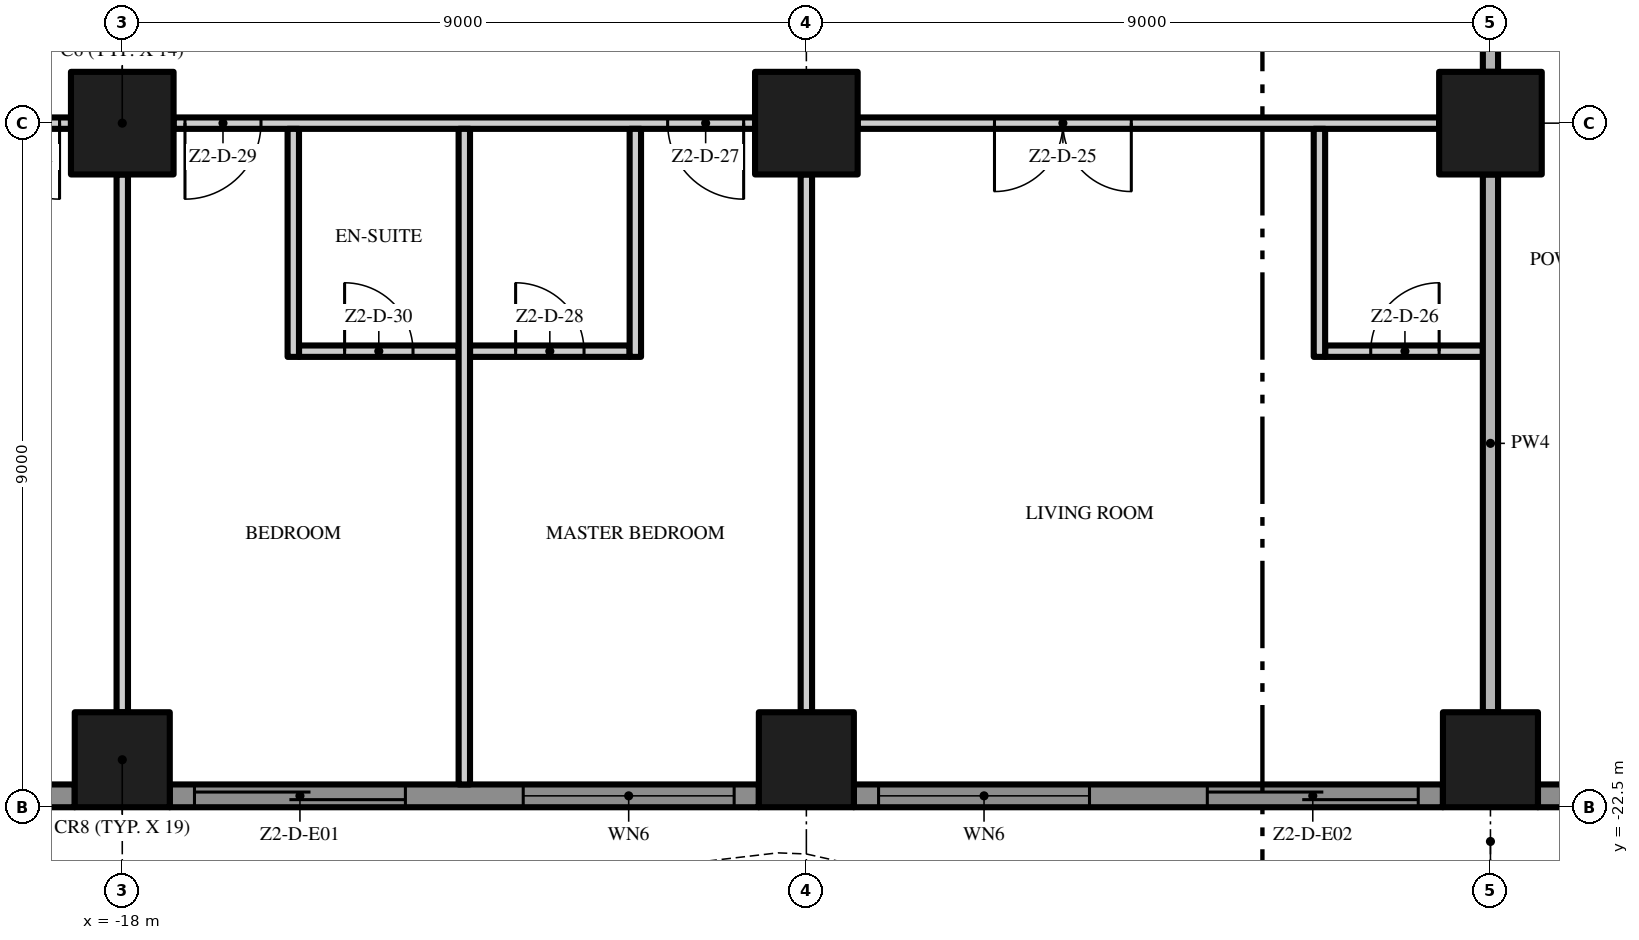
"""IFC4 building model, lengths in metres.
Left out: names, types, materials, properties, quantities, classifications, styles, units other than length and angle.
Written with IfcOpenShell. Run it as: python <this file> out.ifc"""

import sys

from ifc_helpers import new_model, si_unit, direction, frame, frame_2d, origin, origin_2d, place, context, subcontext, project, spatial, polyline, rectangle, outline, extrude, element, fill, save


model = new_model("IFC4")
c1 = context("Model", 3, precision=1e-05, world=origin(), true_north=direction((0.0, 1.0)))
c2 = subcontext(c1, "Body", "Model", "MODEL_VIEW")
j1 = project(units=[si_unit("LENGTHUNIT", "METRE"), si_unit("PLANEANGLEUNIT", "RADIAN")], contexts=[c1])
p1 = place(None, origin())
s1 = spatial("IfcSite", under=j1, at=p1, CompositionType="ELEMENT")
p2 = place(p1, origin())
s2 = spatial("IfcBuilding", under=s1, at=p2, CompositionType="ELEMENT")
p3 = place(p2, frame((0.0, 0.0, 103.6)))
s3 = spatial("IfcBuildingStorey", under=s2, at=p3, CompositionType="ELEMENT", Elevation=103.6)
p4 = place(p3, frame((-18.0, -13.5, 0.0), z_axis=(0.0, 0.0, 1.0), x_axis=(1.0, 0.0, 0.0)))
e1 = element("IfcColumn", 1, at=p4, inside=s3, PredefinedType="COLUMN", context=c2, shape_type="SweptSolid", body=[
    extrude(rectangle(XDim=1.35, YDim=1.35, at=origin_2d()), origin(), (0.0, 0.0, 1.0), 3.5),
])
p5 = place(p3, frame((-18.0, -21.875, 0.0), z_axis=(0.0, 0.0, 1.0), x_axis=(1.0, 0.0, 0.0)))
e2 = element("IfcColumn", 2, at=p5, inside=s3, PredefinedType="COLUMN", context=c2, shape_type="SweptSolid", body=[
    extrude(rectangle(XDim=1.25, YDim=1.25, at=origin_2d()), origin(), (0.0, 0.0, 1.0), 3.5),
])
p6 = place(p3, frame((-9.0, -13.5, 0.0), z_axis=(0.0, 0.0, 1.0), x_axis=(1.0, 0.0, 0.0)))
e3 = element("IfcColumn", 3, at=p6, inside=s3, PredefinedType="COLUMN", context=c2, shape_type="SweptSolid", body=[
    extrude(rectangle(XDim=1.35, YDim=1.35, at=origin_2d()), origin(), (0.0, 0.0, 1.0), 3.5),
])
p7 = place(p3, frame((-9.0, -21.875, 0.0), z_axis=(0.0, 0.0, 1.0), x_axis=(1.0, 0.0, 0.0)))
e4 = element("IfcColumn", 4, at=p7, inside=s3, PredefinedType="COLUMN", context=c2, shape_type="SweptSolid", body=[
    extrude(rectangle(XDim=1.25, YDim=1.25, at=origin_2d()), origin(), (0.0, 0.0, 1.0), 3.5),
])
p8 = place(p3, frame((0.0, -13.5, 0.0), z_axis=(0.0, 0.0, 1.0), x_axis=(1.0, 0.0, 0.0)))
e5 = element("IfcColumn", 5, at=p8, inside=s3, PredefinedType="COLUMN", context=c2, shape_type="SweptSolid", body=[
    extrude(rectangle(XDim=1.35, YDim=1.35, at=origin_2d()), origin(), (0.0, 0.0, 1.0), 3.5),
])
p9 = place(p3, frame((0.0, -21.875, 0.0), z_axis=(0.0, 0.0, 1.0), x_axis=(1.0, 0.0, 0.0)))
e6 = element("IfcColumn", 6, at=p9, inside=s3, PredefinedType="COLUMN", context=c2, shape_type="SweptSolid", body=[
    extrude(rectangle(XDim=1.25, YDim=1.25, at=origin_2d()), origin(), (0.0, 0.0, 1.0), 3.5),
])
p10 = place(p3, frame((-18.625, -22.35, 0.0), z_axis=(0.0, 0.0, 1.0), x_axis=(-1.0, 0.0, 0.0)))
e7 = element("IfcWall", 7, at=p10, inside=s3, PredefinedType="SOLIDWALL", context=c2, shape_type="SweptSolid", body=[
    extrude(rectangle(XDim=3.575, YDim=0.3, at=frame_2d((1.788, 0.0))), origin(), (0.0, 0.0, 1.0), 3.5),
])
p11 = place(p10, frame((0.325, 0.0, 0.45)))
e8 = element("IfcOpeningElement", 8, at=p11, cuts=e7, PredefinedType="OPENING", context=c2, shape_type="SweptSolid", body=[
    extrude(rectangle(XDim=2.775, YDim=2.65, at=frame_2d((1.387, 1.325))), frame((0.0, 0.16, 0.0), z_axis=(0.0, -1.0, 0.0), x_axis=(1.0, 0.0, 0.0)), (0.0, 0.0, 1.0), 0.32),
])
p12 = place(p3, frame((-9.625, -22.35, 0.0), z_axis=(0.0, 0.0, 1.0), x_axis=(-1.0, 0.0, 0.0)))
e9 = element("IfcWall", 9, at=p12, inside=s3, PredefinedType="SOLIDWALL", context=c2, shape_type="SweptSolid", body=[
    extrude(rectangle(XDim=7.75, YDim=0.3, at=frame_2d((3.875, 0.0))), origin(), (0.0, 0.0, 1.0), 3.5),
])
p13 = place(p12, frame((4.65, 0.0, 0.0)))
e10 = element("IfcOpeningElement", 10, at=p13, cuts=e9, PredefinedType="OPENING", context=c2, shape_type="SweptSolid", body=[
    extrude(rectangle(XDim=2.775, YDim=2.4, at=frame_2d((1.387, 1.2))), frame((0.0, 0.16, 0.0), z_axis=(0.0, -1.0, 0.0), x_axis=(1.0, 0.0, 0.0)), (0.0, 0.0, 1.0), 0.32),
])
p14 = place(p12, frame((0.325, 0.0, 0.45)))
e11 = element("IfcOpeningElement", 11, at=p14, cuts=e9, PredefinedType="OPENING", context=c2, shape_type="SweptSolid", body=[
    extrude(rectangle(XDim=2.775, YDim=2.65, at=frame_2d((1.387, 1.325))), frame((0.0, 0.16, 0.0), z_axis=(0.0, -1.0, 0.0), x_axis=(1.0, 0.0, 0.0)), (0.0, 0.0, 1.0), 0.32),
])
p15 = place(p3, frame((-0.625, -22.35, 0.0), z_axis=(0.0, 0.0, 1.0), x_axis=(-1.0, 0.0, 0.0)))
e12 = element("IfcWall", 12, at=p15, inside=s3, PredefinedType="SOLIDWALL", context=c2, shape_type="SweptSolid", body=[
    extrude(rectangle(XDim=7.75, YDim=0.3, at=frame_2d((3.875, 0.0))), origin(), (0.0, 0.0, 1.0), 3.5),
])
p16 = place(p15, frame((4.65, 0.0, 0.45)))
e13 = element("IfcOpeningElement", 13, at=p16, cuts=e12, PredefinedType="OPENING", context=c2, shape_type="SweptSolid", body=[
    extrude(rectangle(XDim=2.775, YDim=2.65, at=frame_2d((1.387, 1.325))), frame((0.0, 0.16, 0.0), z_axis=(0.0, -1.0, 0.0), x_axis=(1.0, 0.0, 0.0)), (0.0, 0.0, 1.0), 0.32),
])
p17 = place(p15, frame((0.325, 0.0, 0.0)))
e14 = element("IfcOpeningElement", 14, at=p17, cuts=e12, PredefinedType="OPENING", context=c2, shape_type="SweptSolid", body=[
    extrude(rectangle(XDim=2.775, YDim=2.4, at=frame_2d((1.387, 1.2))), frame((0.0, 0.16, 0.0), z_axis=(0.0, -1.0, 0.0), x_axis=(1.0, 0.0, 0.0)), (0.0, 0.0, 1.0), 0.32),
])
p18 = place(p3, frame((8.375, -22.35, 0.0), z_axis=(0.0, 0.0, 1.0), x_axis=(-1.0, 0.0, 0.0)))
e15 = element("IfcWall", 15, at=p18, inside=s3, PredefinedType="SOLIDWALL", context=c2, shape_type="SweptSolid", body=[
    extrude(rectangle(XDim=7.75, YDim=0.3, at=frame_2d((3.875, 0.0))), origin(), (0.0, 0.0, 1.0), 3.5),
])
p19 = place(p18, frame((4.65, 0.0, 0.45)))
e16 = element("IfcOpeningElement", 16, at=p19, cuts=e15, PredefinedType="OPENING", context=c2, shape_type="SweptSolid", body=[
    extrude(rectangle(XDim=2.775, YDim=2.65, at=frame_2d((1.387, 1.325))), frame((0.0, 0.16, 0.0), z_axis=(0.0, -1.0, 0.0), x_axis=(1.0, 0.0, 0.0)), (0.0, 0.0, 1.0), 0.32),
])
p20 = place(p18, frame((0.325, 0.0, 0.45)))
e17 = element("IfcOpeningElement", 17, at=p20, cuts=e15, PredefinedType="OPENING", context=c2, shape_type="SweptSolid", body=[
    extrude(rectangle(XDim=2.775, YDim=2.65, at=frame_2d((1.387, 1.325))), frame((0.0, 0.16, 0.0), z_axis=(0.0, -1.0, 0.0), x_axis=(1.0, 0.0, 0.0)), (0.0, 0.0, 1.0), 0.32),
])
p21 = place(p3, origin())
e18 = element("IfcWall", 18, at=p21, inside=s3, PredefinedType="USERDEFINED", context=c2, shape_type="SweptSolid", body=[
    extrude(outline(polyline([(-22.5, -23.451), (-21.0, -24.112), (-19.5, -24.845), (-18.0, -25.369), (-16.875, -25.5), (-16.5, -25.485), (-15.0, -25.149), (-13.5, -24.488), (-12.0, -23.755), (-10.5, -23.231), (-9.375, -23.1), (-9.0, -23.115), (-7.5, -23.451), (-6.0, -24.112), (-4.5, -24.845), (-3.0, -25.369), (-1.875, -25.5), (-1.5, -25.485), (0.0, -25.149), (1.5, -24.488), (3.0, -23.755), (4.5, -23.231), (5.625, -23.1), (6.0, -23.115), (7.5, -23.451), (9.0, -24.112), (10.5, -24.845), (12.0, -25.369), (13.125, -25.5), (13.5, -25.485), (15.0, -25.149), (16.5, -24.488), (18.0, -23.755), (19.5, -23.231), (20.625, -23.1), (21.0, -23.115), (22.5, -23.451), (22.555, -23.208), (21.033, -22.866), (20.615, -22.849), (19.444, -22.986), (17.904, -23.524), (16.395, -24.261), (14.921, -24.91), (13.467, -25.236), (13.135, -25.249), (12.056, -25.124), (10.596, -24.614), (9.105, -23.885), (7.579, -23.213), (6.033, -22.866), (5.615, -22.849), (4.444, -22.986), (2.904, -23.524), (1.395, -24.261), (-0.079, -24.91), (-1.533, -25.236), (-1.865, -25.249), (-2.944, -25.124), (-4.404, -24.614), (-5.895, -23.885), (-7.421, -23.213), (-8.967, -22.866), (-9.385, -22.849), (-10.556, -22.986), (-12.096, -23.524), (-13.605, -24.261), (-15.079, -24.91), (-16.533, -25.236), (-16.865, -25.249), (-17.944, -25.124), (-19.404, -24.614), (-20.895, -23.885), (-22.399, -23.223), (-22.5, -23.451)])), origin(), (0.0, 0.0, 1.0), 0.9),
])
p22 = place(p3, frame((-15.675, -16.5, 0.0), z_axis=(0.0, 0.0, 1.0), x_axis=(1.0, 0.0, 0.0)))
e19 = element("IfcWall", 19, at=p22, inside=s3, PredefinedType="PARTITIONING", context=c2, shape_type="SweptSolid", body=[
    extrude(rectangle(XDim=2.1, YDim=0.15, at=frame_2d((1.05, 0.0))), origin(), (0.0, 0.0, 1.0), 3.5),
])
p23 = place(p22, frame((0.6, 0.0, 0.0)))
e20 = element("IfcOpeningElement", 20, at=p23, cuts=e19, PredefinedType="OPENING", context=c2, shape_type="SweptSolid", body=[
    extrude(rectangle(XDim=0.9, YDim=2.1, at=frame_2d((0.45, 1.05))), frame((0.0, 0.085, 0.0), z_axis=(0.0, -1.0, 0.0), x_axis=(1.0, 0.0, 0.0)), (0.0, 0.0, 1.0), 0.17),
])
p24 = place(p3, frame((-13.425, -16.5, 0.0), z_axis=(0.0, 0.0, 1.0), x_axis=(1.0, 0.0, 0.0)))
e21 = element("IfcWall", 21, at=p24, inside=s3, PredefinedType="PARTITIONING", context=c2, shape_type="SweptSolid", body=[
    extrude(rectangle(XDim=2.1, YDim=0.15, at=frame_2d((1.05, 0.0))), origin(), (0.0, 0.0, 1.0), 3.5),
])
p25 = place(p24, frame((0.6, 0.0, 0.0)))
e22 = element("IfcOpeningElement", 22, at=p25, cuts=e21, PredefinedType="OPENING", context=c2, shape_type="SweptSolid", body=[
    extrude(rectangle(XDim=0.9, YDim=2.1, at=frame_2d((0.45, 1.05))), frame((0.0, 0.085, 0.0), z_axis=(0.0, -1.0, 0.0), x_axis=(1.0, 0.0, 0.0)), (0.0, 0.0, 1.0), 0.17),
])
p26 = place(p3, frame((-2.175, -16.5, 0.0), z_axis=(0.0, 0.0, 1.0), x_axis=(1.0, 0.0, 0.0)))
e23 = element("IfcWall", 23, at=p26, inside=s3, PredefinedType="PARTITIONING", context=c2, shape_type="SweptSolid", body=[
    extrude(rectangle(XDim=2.075, YDim=0.15, at=frame_2d((1.038, 0.0))), origin(), (0.0, 0.0, 1.0), 3.5),
])
p27 = place(p26, frame((0.6, 0.0, 0.0)))
e24 = element("IfcOpeningElement", 24, at=p27, cuts=e23, PredefinedType="OPENING", context=c2, shape_type="SweptSolid", body=[
    extrude(rectangle(XDim=0.9, YDim=2.1, at=frame_2d((0.45, 1.05))), frame((0.0, 0.085, 0.0), z_axis=(0.0, -1.0, 0.0), x_axis=(1.0, 0.0, 0.0)), (0.0, 0.0, 1.0), 0.17),
])
p28 = place(p3, frame((-18.675, -13.5, 0.0), z_axis=(0.0, 0.0, 1.0), x_axis=(-1.0, 0.0, 0.0)))
e25 = element("IfcWall", 25, at=p28, inside=s3, PredefinedType="PARTITIONING", context=c2, shape_type="SweptSolid", body=[
    extrude(rectangle(XDim=7.075, YDim=0.15, at=frame_2d((3.538, 0.0))), origin(), (0.0, 0.0, 1.0), 3.5),
])
p29 = place(p28, frame((0.15, 0.0, 0.0)))
e26 = element("IfcOpeningElement", 26, at=p29, cuts=e25, PredefinedType="OPENING", context=c2, shape_type="SweptSolid", body=[
    extrude(rectangle(XDim=1.0, YDim=2.4, at=frame_2d((0.5, 1.2))), frame((0.0, 0.085, 0.0), z_axis=(0.0, -1.0, 0.0), x_axis=(1.0, 0.0, 0.0)), (0.0, 0.0, 1.0), 0.17),
])
p30 = place(p28, frame((5.325, 0.0, 0.0)))
e27 = element("IfcOpeningElement", 27, at=p30, cuts=e25, PredefinedType="OPENING", context=c2, shape_type="SweptSolid", body=[
    extrude(rectangle(XDim=1.5, YDim=2.4, at=frame_2d((0.75, 1.2))), frame((0.0, 0.085, 0.0), z_axis=(0.0, -1.0, 0.0), x_axis=(1.0, 0.0, 0.0)), (0.0, 0.0, 1.0), 0.17),
])
p31 = place(p3, frame((-9.675, -13.5, 0.0), z_axis=(0.0, 0.0, 1.0), x_axis=(-1.0, 0.0, 0.0)))
e28 = element("IfcWall", 28, at=p31, inside=s3, PredefinedType="PARTITIONING", context=c2, shape_type="SweptSolid", body=[
    extrude(rectangle(XDim=7.65, YDim=0.15, at=frame_2d((3.825, 0.0))), origin(), (0.0, 0.0, 1.0), 3.5),
])
p32 = place(p31, frame((0.15, 0.0, 0.0)))
e29 = element("IfcOpeningElement", 29, at=p32, cuts=e28, PredefinedType="OPENING", context=c2, shape_type="SweptSolid", body=[
    extrude(rectangle(XDim=1.0, YDim=2.4, at=frame_2d((0.5, 1.2))), frame((0.0, 0.085, 0.0), z_axis=(0.0, -1.0, 0.0), x_axis=(1.0, 0.0, 0.0)), (0.0, 0.0, 1.0), 0.17),
])
p33 = place(p31, frame((6.5, 0.0, 0.0)))
e30 = element("IfcOpeningElement", 30, at=p33, cuts=e28, PredefinedType="OPENING", context=c2, shape_type="SweptSolid", body=[
    extrude(rectangle(XDim=1.0, YDim=2.4, at=frame_2d((0.5, 1.2))), frame((0.0, 0.085, 0.0), z_axis=(0.0, -1.0, 0.0), x_axis=(1.0, 0.0, 0.0)), (0.0, 0.0, 1.0), 0.17),
])
p34 = place(p3, frame((-0.675, -13.5, 0.0), z_axis=(0.0, 0.0, 1.0), x_axis=(-1.0, 0.0, 0.0)))
e31 = element("IfcWall", 31, at=p34, inside=s3, PredefinedType="PARTITIONING", context=c2, shape_type="SweptSolid", body=[
    extrude(rectangle(XDim=7.65, YDim=0.15, at=frame_2d((3.825, 0.0))), origin(), (0.0, 0.0, 1.0), 3.5),
])
p35 = place(p34, frame((4.05, 0.0, 0.0)))
e32 = element("IfcOpeningElement", 32, at=p35, cuts=e31, PredefinedType="OPENING", context=c2, shape_type="SweptSolid", body=[
    extrude(rectangle(XDim=1.8, YDim=2.4, at=frame_2d((0.9, 1.2))), frame((0.0, 0.085, 0.0), z_axis=(0.0, -1.0, 0.0), x_axis=(1.0, 0.0, 0.0)), (0.0, 0.0, 1.0), 0.17),
])
p36 = place(p3, frame((-18.0, -21.25, 0.0), z_axis=(0.0, 0.0, 1.0), x_axis=(0.0, 1.0, 0.0)))
e33 = element("IfcWall", 33, at=p36, inside=s3, PredefinedType="PARTITIONING", context=c2, shape_type="SweptSolid", body=[
    extrude(rectangle(XDim=7.075, YDim=0.15, at=frame_2d((3.538, 0.0))), origin(), (0.0, 0.0, 1.0), 3.5),
])
p37 = place(p3, frame((-15.75, -16.575, 0.0), z_axis=(0.0, 0.0, 1.0), x_axis=(0.0, 1.0, 0.0)))
e34 = element("IfcWall", 34, at=p37, inside=s3, PredefinedType="PARTITIONING", context=c2, shape_type="SweptSolid", body=[
    extrude(rectangle(XDim=3.0, YDim=0.15, at=frame_2d((1.5, 0.0))), origin(), (0.0, 0.0, 1.0), 3.5),
])
p38 = place(p3, frame((-13.5, -22.2, 0.0), z_axis=(0.0, 0.0, 1.0), x_axis=(0.0, 1.0, 0.0)))
e35 = element("IfcWall", 35, at=p38, inside=s3, PredefinedType="PARTITIONING", context=c2, shape_type="SweptSolid", body=[
    extrude(rectangle(XDim=8.625, YDim=0.15, at=frame_2d((4.312, 0.0))), origin(), (0.0, 0.0, 1.0), 3.5),
])
p39 = place(p3, frame((-11.25, -16.575, 0.0), z_axis=(0.0, 0.0, 1.0), x_axis=(0.0, 1.0, 0.0)))
e36 = element("IfcWall", 36, at=p39, inside=s3, PredefinedType="PARTITIONING", context=c2, shape_type="SweptSolid", body=[
    extrude(rectangle(XDim=3.0, YDim=0.15, at=frame_2d((1.5, 0.0))), origin(), (0.0, 0.0, 1.0), 3.5),
])
p40 = place(p3, frame((-9.0, -21.25, 0.0), z_axis=(0.0, 0.0, 1.0), x_axis=(0.0, 1.0, 0.0)))
e37 = element("IfcWall", 37, at=p40, inside=s3, PredefinedType="PARTITIONING", context=c2, shape_type="SweptSolid", body=[
    extrude(rectangle(XDim=7.075, YDim=0.15, at=frame_2d((3.538, 0.0))), origin(), (0.0, 0.0, 1.0), 3.5),
])
p41 = place(p3, frame((-2.25, -16.575, 0.0), z_axis=(0.0, 0.0, 1.0), x_axis=(0.0, 1.0, 0.0)))
e38 = element("IfcWall", 38, at=p41, inside=s3, PredefinedType="PARTITIONING", context=c2, shape_type="SweptSolid", body=[
    extrude(rectangle(XDim=3.0, YDim=0.15, at=frame_2d((1.5, 0.0))), origin(), (0.0, 0.0, 1.0), 3.5),
])
p42 = place(p3, frame((0.0, -21.25, 0.0), z_axis=(0.0, 0.0, 1.0), x_axis=(0.0, 1.0, 0.0)))
e39 = element("IfcWall", 39, at=p42, inside=s3, PredefinedType="PARTITIONING", context=c2, shape_type="SweptSolid", body=[
    extrude(rectangle(XDim=7.075, YDim=0.2, at=frame_2d((3.538, 0.0))), origin(), (0.0, 0.0, 1.0), 3.5),
])
p43 = place(p3, frame((0.0, -12.825, 0.0), z_axis=(0.0, 0.0, 1.0), x_axis=(0.0, 1.0, 0.0)))
e40 = element("IfcWall", 40, at=p43, inside=s3, PredefinedType="PARTITIONING", context=c2, shape_type="SweptSolid", body=[
    extrude(rectangle(XDim=7.65, YDim=0.2, at=frame_2d((3.825, 0.0))), origin(), (0.0, 0.0, 1.0), 3.5),
])
p44 = place(p13, origin())
e41 = element("IfcDoor", 41, at=p44, inside=s3, OperationType="SINGLE_SWING_LEFT", PredefinedType="DOOR", context=c2, shape_type="SweptSolid", body=[
    extrude(rectangle(XDim=2.775, YDim=2.4, at=frame_2d((1.387, 1.2))), frame((0.0, 0.025, 0.0), z_axis=(0.0, -1.0, 0.0), x_axis=(1.0, 0.0, 0.0)), (0.0, 0.0, 1.0), 0.05),
])
fill(e10, e41)
p45 = place(p14, origin())
e42 = element("IfcWindow", 42, at=p45, inside=s3, PartitioningType="SINGLE_PANEL", PredefinedType="WINDOW", context=c2, shape_type="SweptSolid", body=[
    extrude(rectangle(XDim=2.775, YDim=2.65, at=frame_2d((1.387, 1.325))), frame((0.0, 0.03, 0.0), z_axis=(0.0, -1.0, 0.0), x_axis=(1.0, 0.0, 0.0)), (0.0, 0.0, 1.0), 0.06),
])
fill(e11, e42)
p46 = place(p16, origin())
e43 = element("IfcWindow", 43, at=p46, inside=s3, PartitioningType="SINGLE_PANEL", PredefinedType="WINDOW", context=c2, shape_type="SweptSolid", body=[
    extrude(rectangle(XDim=2.775, YDim=2.65, at=frame_2d((1.387, 1.325))), frame((0.0, 0.03, 0.0), z_axis=(0.0, -1.0, 0.0), x_axis=(1.0, 0.0, 0.0)), (0.0, 0.0, 1.0), 0.06),
])
fill(e13, e43)
p47 = place(p17, origin())
e44 = element("IfcDoor", 44, at=p47, inside=s3, OperationType="SINGLE_SWING_LEFT", PredefinedType="DOOR", context=c2, shape_type="SweptSolid", body=[
    extrude(rectangle(XDim=2.775, YDim=2.4, at=frame_2d((1.387, 1.2))), frame((0.0, 0.025, 0.0), z_axis=(0.0, -1.0, 0.0), x_axis=(1.0, 0.0, 0.0)), (0.0, 0.0, 1.0), 0.05),
])
fill(e14, e44)
p48 = place(p35, origin())
e45 = element("IfcDoor", 45, at=p48, inside=s3, OperationType="DOUBLE_DOOR_SINGLE_SWING", PredefinedType="DOOR", context=c2, shape_type="SweptSolid", body=[
    extrude(rectangle(XDim=1.8, YDim=2.4, at=frame_2d((0.9, 1.2))), frame((0.0, 0.025, 0.0), z_axis=(0.0, -1.0, 0.0), x_axis=(1.0, 0.0, 0.0)), (0.0, 0.0, 1.0), 0.05),
])
fill(e32, e45)
p49 = place(p27, origin())
e46 = element("IfcDoor", 46, at=p49, inside=s3, OperationType="SINGLE_SWING_RIGHT", PredefinedType="DOOR", context=c2, shape_type="SweptSolid", body=[
    extrude(rectangle(XDim=0.9, YDim=2.1, at=frame_2d((0.45, 1.05))), frame((0.0, 0.025, 0.0), z_axis=(0.0, -1.0, 0.0), x_axis=(1.0, 0.0, 0.0)), (0.0, 0.0, 1.0), 0.05),
])
fill(e24, e46)
p50 = place(p32, origin())
e47 = element("IfcDoor", 47, at=p50, inside=s3, OperationType="SINGLE_SWING_LEFT", PredefinedType="DOOR", context=c2, shape_type="SweptSolid", body=[
    extrude(rectangle(XDim=1.0, YDim=2.4, at=frame_2d((0.5, 1.2))), frame((0.0, 0.025, 0.0), z_axis=(0.0, -1.0, 0.0), x_axis=(1.0, 0.0, 0.0)), (0.0, 0.0, 1.0), 0.05),
])
fill(e29, e47)
p51 = place(p25, origin())
e48 = element("IfcDoor", 48, at=p51, inside=s3, OperationType="SINGLE_SWING_LEFT", PredefinedType="DOOR", context=c2, shape_type="SweptSolid", body=[
    extrude(rectangle(XDim=0.9, YDim=2.1, at=frame_2d((0.45, 1.05))), frame((0.0, 0.025, 0.0), z_axis=(0.0, -1.0, 0.0), x_axis=(1.0, 0.0, 0.0)), (0.0, 0.0, 1.0), 0.05),
])
fill(e22, e48)
p52 = place(p33, origin())
e49 = element("IfcDoor", 49, at=p52, inside=s3, OperationType="SINGLE_SWING_RIGHT", PredefinedType="DOOR", context=c2, shape_type="SweptSolid", body=[
    extrude(rectangle(XDim=1.0, YDim=2.4, at=frame_2d((0.5, 1.2))), frame((0.0, 0.025, 0.0), z_axis=(0.0, -1.0, 0.0), x_axis=(1.0, 0.0, 0.0)), (0.0, 0.0, 1.0), 0.05),
])
fill(e30, e49)
p53 = place(p23, origin())
e50 = element("IfcDoor", 50, at=p53, inside=s3, OperationType="SINGLE_SWING_LEFT", PredefinedType="DOOR", context=c2, shape_type="SweptSolid", body=[
    extrude(rectangle(XDim=0.9, YDim=2.1, at=frame_2d((0.45, 1.05))), frame((0.0, 0.025, 0.0), z_axis=(0.0, -1.0, 0.0), x_axis=(1.0, 0.0, 0.0)), (0.0, 0.0, 1.0), 0.05),
])
fill(e20, e50)
p54 = place(p29, origin())
e51 = element("IfcDoor", 51, at=p54, inside=s3, OperationType="SINGLE_SWING_LEFT", PredefinedType="DOOR", context=c2, shape_type="SweptSolid", body=[
    extrude(rectangle(XDim=1.0, YDim=2.4, at=frame_2d((0.5, 1.2))), frame((0.0, 0.025, 0.0), z_axis=(0.0, -1.0, 0.0), x_axis=(1.0, 0.0, 0.0)), (0.0, 0.0, 1.0), 0.05),
])
fill(e26, e51)
save(model, sys.argv[1])
